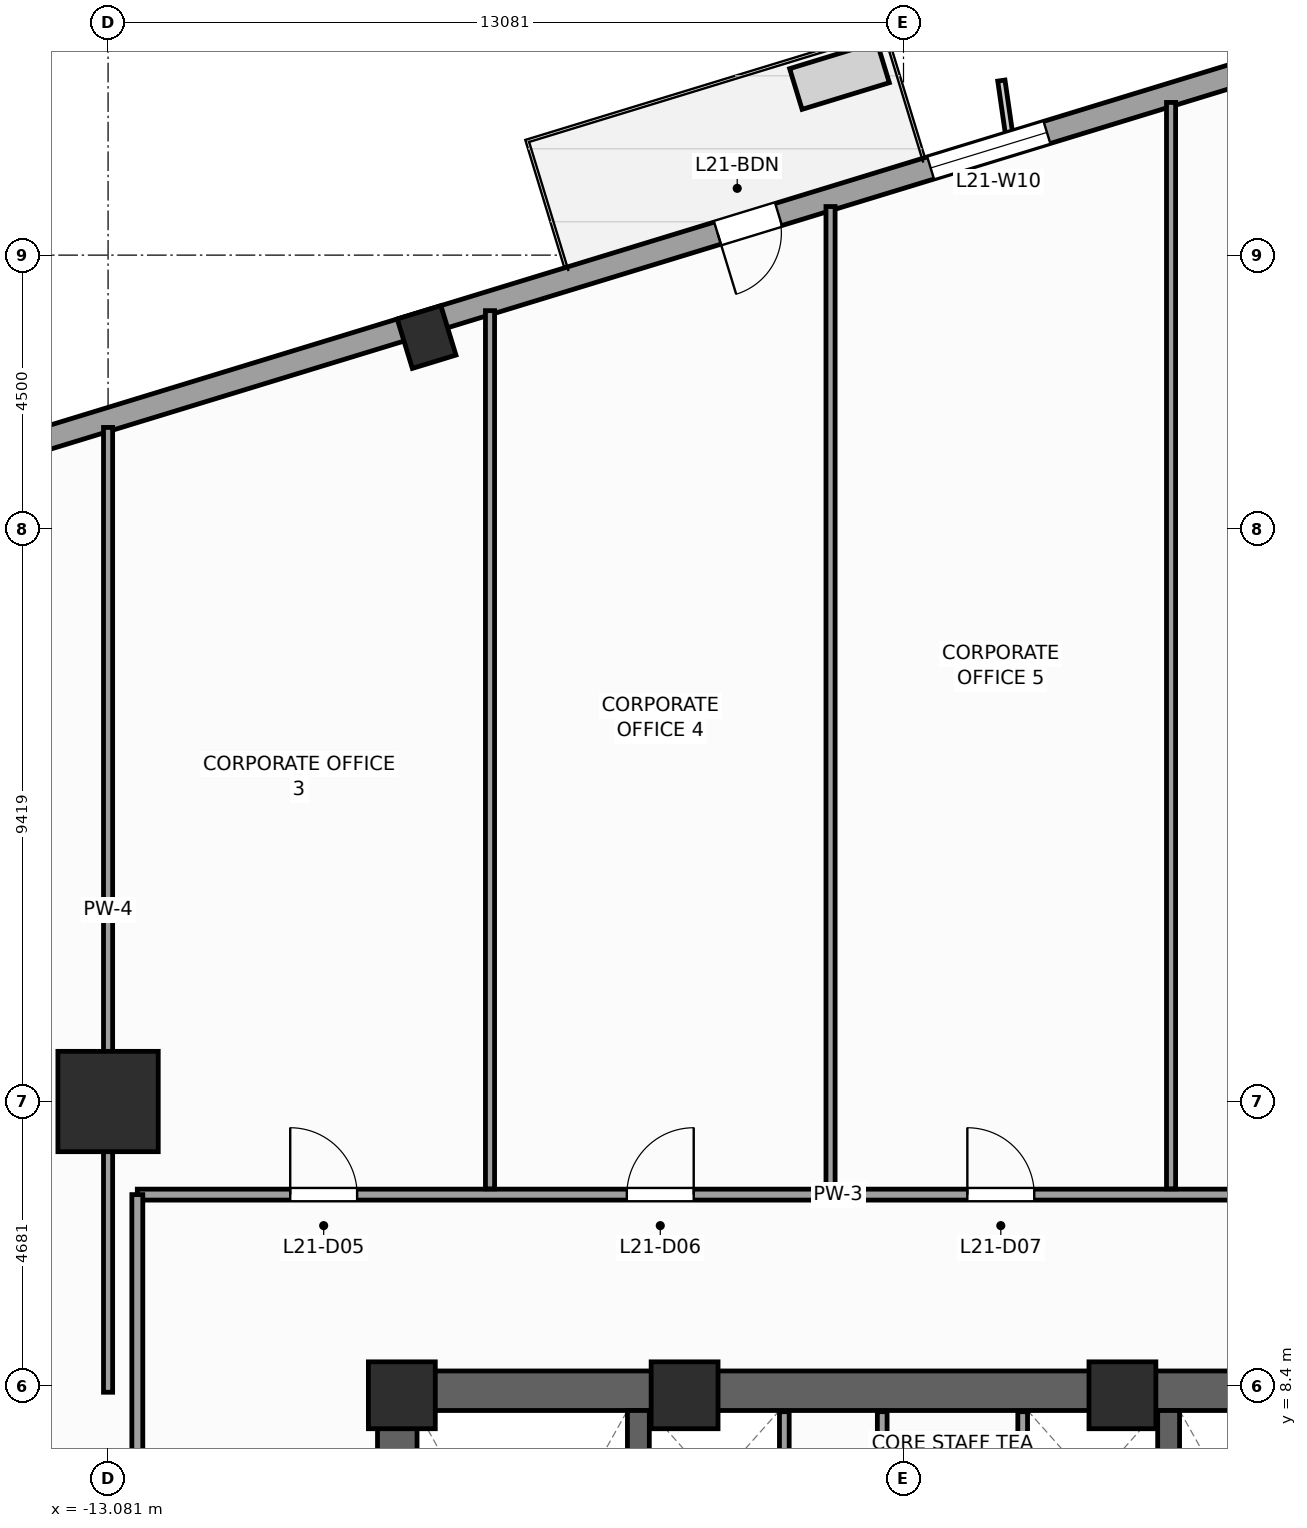
"""IFC4 building model, lengths in metres.
Left out: names, types, materials, properties, quantities, classifications, styles, units other than length and angle.
Written with IfcOpenShell. Run it as: python <this file> out.ifc"""

import sys

from ifc_helpers import new_model, si_unit, direction, frame, frame_2d, origin, origin_2d, place, context, subcontext, project, spatial, rectangle, extrude, source, transform, mapped, element, fill, save


model = new_model("IFC4")
c1 = context("Model", 3, precision=1e-05, world=origin(), true_north=direction((0.0, 1.0)))
c2 = subcontext(c1, "Body", "Model", "MODEL_VIEW")
j1 = project(units=[si_unit("LENGTHUNIT", "METRE"), si_unit("PLANEANGLEUNIT", "RADIAN")], contexts=[c1])
p1 = place(None, origin())
s1 = spatial("IfcSite", under=j1, at=p1, CompositionType="ELEMENT")
p2 = place(p1, origin())
s2 = spatial("IfcBuilding", under=s1, at=p2, CompositionType="ELEMENT")
p3 = place(p2, frame((0.0, 0.0, 91.2)))
s3 = spatial("IfcBuildingStorey", under=s2, at=p3, CompositionType="ELEMENT", Elevation=91.2)
p4 = place(p3, frame((-8.65, 8.325, 0.0), z_axis=(0.0, 0.0, 1.0), x_axis=(1.0, 0.0, 0.0)))
e1 = element("IfcWall", 1, at=p4, inside=s3, PredefinedType="SHEAR", context=c2, shape_type="SweptSolid", body=[
    extrude(rectangle(XDim=17.3, YDim=0.65, at=frame_2d((8.65, 0.0))), origin(), (0.0, 0.0, 1.0), 4.0),
])
p5 = place(p3, frame((-8.325, -8.0, 0.0), z_axis=(0.0, 0.0, 1.0), x_axis=(0.0, 1.0, 0.0)))
e2 = element("IfcWall", 2, at=p5, inside=s3, PredefinedType="SHEAR", context=c2, shape_type="SweptSolid", body=[
    extrude(rectangle(XDim=16.0, YDim=0.65, at=frame_2d((8.0, 0.0))), origin(), (0.0, 0.0, 1.0), 4.0),
])
p6 = place(p5, frame((4.69, 0.0, 0.0)))
e3 = element("IfcOpeningElement", 3, at=p6, cuts=e2, PredefinedType="OPENING", context=c2, shape_type="SweptSolid", body=[
    extrude(rectangle(XDim=1.3, YDim=2.2, at=frame_2d((0.65, 1.1))), frame((0.0, 0.335, 0.0), z_axis=(0.0, -1.0, 0.0), x_axis=(1.0, 0.0, 0.0)), (0.0, 0.0, 1.0), 0.67),
])
for number, where, z_axis, x_axis in (
    (4, (-4.36, -8.0, 0.0), (0.0, 0.0, 1.0), (0.0, 1.0, 0.0)),
    (5, (4.36, -8.0, 0.0), (0.0, 0.0, 1.0), (0.0, 1.0, 0.0)),
):
    element("IfcWall", number, at=place(p3, frame(where, z_axis=z_axis, x_axis=x_axis)), inside=s3, PredefinedType="SHEAR", context=c2, shape_type="SweptSolid", body=[
        extrude(rectangle(XDim=16.0, YDim=0.36, at=frame_2d((8.0, 0.0))), origin(), (0.0, 0.0, 1.0), 4.0),
    ])
m1 = source(origin(), c2, "Body", "SweptSolid", [
    extrude(rectangle(XDim=1.1, YDim=1.1, at=origin_2d()), origin(), (0.0, 0.0, 1.0), 4.0),
])
for number, where, z_axis, x_axis in (
    (6, (-8.25, 8.25, 0.0), (0.0, 0.0, 1.0), (1.0, 0.0, 0.0)),
    (7, (-3.6, 8.25, 0.0), (0.0, 0.0, 1.0), (1.0, 0.0, 0.0)),
    (8, (3.6, 8.25, 0.0), (0.0, 0.0, 1.0), (1.0, 0.0, 0.0)),
):
    element("IfcColumn", number, at=place(p3, frame(where, z_axis=z_axis, x_axis=x_axis)), inside=s3, PredefinedType="PILASTER", context=c2, shape_type="MappedRepresentation", body=[
        mapped(m1, transform((0.0, 0.0, 0.0), scale=1.0)),
    ])
m2 = source(origin(), c2, "Body", "SweptSolid", [
    extrude(rectangle(XDim=1.65, YDim=1.65, at=origin_2d()), origin(), (0.0, 0.0, 1.0), 4.0),
])
p7 = place(p3, frame((-13.081, 13.081, 0.0), z_axis=(0.0, 0.0, 1.0), x_axis=(1.0, 0.0, 0.0)))
e9 = element("IfcColumn", 9, at=p7, inside=s3, PredefinedType="COLUMN", context=c2, shape_type="MappedRepresentation", body=[
    mapped(m2, transform((0.0, 0.0, 0.0), scale=1.0)),
])
m3 = source(origin(), c2, "Body", "SweptSolid", [
    extrude(rectangle(XDim=0.75, YDim=0.85, at=origin_2d()), origin(), (0.0, 0.0, 1.0), 4.0),
])
p8 = place(p3, frame((-7.843, 25.653, 0.0), z_axis=(0.0, 0.0, 1.0), x_axis=(0.956304755963, 0.292371704723, 0.0)))
e10 = element("IfcColumn", 10, at=p8, inside=s3, PredefinedType="COLUMN", context=c2, shape_type="MappedRepresentation", body=[
    mapped(m3, transform((0.0, 0.0, 0.0), scale=1.0)),
])
p9 = place(p3, frame((14.265, 32.658, 0.0), z_axis=(0.0, 0.0, 1.0), x_axis=(-0.956304320851, -0.292373127906, 0.0)))
e11 = element("IfcWall", 11, at=p9, inside=s3, PredefinedType="STANDARD", context=c2, shape_type="SweptSolid", body=[
    extrude(rectangle(XDim=46.38, YDim=0.38, at=frame_2d((23.19, 0.0))), origin(), (0.0, 0.0, 1.0), 3.14),
])
p10 = place(p9, frame((17.065, 0.0, 0.0)))
e12 = element("IfcOpeningElement", 12, at=p10, cuts=e11, PredefinedType="OPENING", context=c2, shape_type="SweptSolid", body=[
    extrude(rectangle(XDim=1.05, YDim=2.25, at=frame_2d((0.525, 1.125))), frame((0.0, 0.2, 0.0), z_axis=(0.0, -1.0, 0.0), x_axis=(1.0, 0.0, 0.0)), (0.0, 0.0, 1.0), 0.4),
])
p11 = place(p9, frame((4.865, 0.0, 0.51)))
e13 = element("IfcOpeningElement", 13, at=p11, cuts=e11, PredefinedType="OPENING", context=c2, shape_type="SweptSolid", body=[
    extrude(rectangle(XDim=1.4, YDim=2.4, at=frame_2d((0.7, 1.2))), frame((0.0, 0.2, 0.0), z_axis=(0.0, -1.0, 0.0), x_axis=(1.0, 0.0, 0.0)), (0.0, 0.0, 1.0), 0.4),
])
p12 = place(p9, frame((12.45, 0.0, 0.51)))
e14 = element("IfcOpeningElement", 14, at=p12, cuts=e11, PredefinedType="OPENING", context=c2, shape_type="SweptSolid", body=[
    extrude(rectangle(XDim=2.0, YDim=2.4, at=frame_2d((1.0, 1.2))), frame((0.0, 0.2, 0.0), z_axis=(0.0, -1.0, 0.0), x_axis=(1.0, 0.0, 0.0)), (0.0, 0.0, 1.0), 0.4),
])
p13 = place(p9, frame((30.538, 0.0, 0.51)))
e15 = element("IfcOpeningElement", 15, at=p13, cuts=e11, PredefinedType="OPENING", context=c2, shape_type="SweptSolid", body=[
    extrude(rectangle(XDim=2.0, YDim=2.4, at=frame_2d((1.0, 1.2))), frame((0.0, 0.2, 0.0), z_axis=(0.0, -1.0, 0.0), x_axis=(1.0, 0.0, 0.0)), (0.0, 0.0, 1.0), 0.4),
])
p14 = place(p9, frame((39.187, 0.0, 0.51)))
e16 = element("IfcOpeningElement", 16, at=p14, cuts=e11, PredefinedType="OPENING", context=c2, shape_type="SweptSolid", body=[
    extrude(rectangle(XDim=1.4, YDim=2.4, at=frame_2d((0.7, 1.2))), frame((0.0, 0.2, 0.0), z_axis=(0.0, -1.0, 0.0), x_axis=(1.0, 0.0, 0.0)), (0.0, 0.0, 1.0), 0.4),
])
for number, where, z_axis, x_axis in (
    (17, (-1.96, 4.58, 0.0), (0.0, 0.0, 1.0), (0.0, 1.0, 0.0)),
    (18, (1.96, 4.58, 0.0), (0.0, 0.0, 1.0), (0.0, 1.0, 0.0)),
):
    element("IfcWall", number, at=place(p3, frame(where, z_axis=z_axis, x_axis=x_axis)), inside=s3, PredefinedType="PARTITIONING", context=c2, shape_type="SweptSolid", body=[
        extrude(rectangle(XDim=3.4, YDim=0.16, at=frame_2d((1.7, 0.0))), origin(), (0.0, 0.0, 1.0), 3.74),
    ])
p15 = place(p3, frame((-0.35, 4.6, 0.0), z_axis=(0.0, 0.0, 1.0), x_axis=(0.0, 1.0, 0.0)))
e19 = element("IfcWall", 19, at=p15, inside=s3, PredefinedType="PARTITIONING", context=c2, shape_type="SweptSolid", body=[
    extrude(rectangle(XDim=3.38, YDim=0.16, at=frame_2d((1.69, 0.0))), origin(), (0.0, 0.0, 1.0), 3.74),
])
p16 = place(p3, frame((-12.6, 11.55, 0.0), z_axis=(0.0, 0.0, 1.0), x_axis=(1.0, 0.0, 0.0)))
e20 = element("IfcWall", 20, at=p16, inside=s3, PredefinedType="PARTITIONING", context=c2, shape_type="SweptSolid", body=[
    extrude(rectangle(XDim=23.05, YDim=0.18, at=frame_2d((11.525, 0.0))), origin(), (0.0, 0.0, 1.0), 3.74),
])
p17 = place(p16, frame((2.514, 0.0, 0.0)))
e21 = element("IfcOpeningElement", 21, at=p17, cuts=e20, PredefinedType="OPENING", context=c2, shape_type="SweptSolid", body=[
    extrude(rectangle(XDim=1.1, YDim=2.2, at=frame_2d((0.55, 1.1))), frame((0.0, 0.1, 0.0), z_axis=(0.0, -1.0, 0.0), x_axis=(1.0, 0.0, 0.0)), (0.0, 0.0, 1.0), 0.2),
])
p18 = place(p16, frame((8.05, 0.0, 0.0)))
e22 = element("IfcOpeningElement", 22, at=p18, cuts=e20, PredefinedType="OPENING", context=c2, shape_type="SweptSolid", body=[
    extrude(rectangle(XDim=1.1, YDim=2.2, at=frame_2d((0.55, 1.1))), frame((0.0, 0.1, 0.0), z_axis=(0.0, -1.0, 0.0), x_axis=(1.0, 0.0, 0.0)), (0.0, 0.0, 1.0), 0.2),
])
p19 = place(p16, frame((13.65, 0.0, 0.0)))
e23 = element("IfcOpeningElement", 23, at=p19, cuts=e20, PredefinedType="OPENING", context=c2, shape_type="SweptSolid", body=[
    extrude(rectangle(XDim=1.1, YDim=2.2, at=frame_2d((0.55, 1.1))), frame((0.0, 0.1, 0.0), z_axis=(0.0, -1.0, 0.0), x_axis=(1.0, 0.0, 0.0)), (0.0, 0.0, 1.0), 0.2),
])
p20 = place(p16, frame((19.311, 0.0, 0.0)))
e24 = element("IfcOpeningElement", 24, at=p20, cuts=e20, PredefinedType="OPENING", context=c2, shape_type="SweptSolid", body=[
    extrude(rectangle(XDim=1.1, YDim=2.2, at=frame_2d((0.55, 1.1))), frame((0.0, 0.1, 0.0), z_axis=(0.0, -1.0, 0.0), x_axis=(1.0, 0.0, 0.0)), (0.0, 0.0, 1.0), 0.2),
])
p21 = place(p3, frame((-12.6, 1.15, 0.0), z_axis=(0.0, 0.0, 1.0), x_axis=(0.0, 1.0, 0.0)))
e25 = element("IfcWall", 25, at=p21, inside=s3, PredefinedType="PARTITIONING", context=c2, shape_type="SweptSolid", body=[
    extrude(rectangle(XDim=10.4, YDim=0.18, at=frame_2d((5.2, 0.0))), origin(), (0.0, 0.0, 1.0), 3.74),
])
p22 = place(p21, frame((4.812, 0.0, 0.0)))
e26 = element("IfcOpeningElement", 26, at=p22, cuts=e25, PredefinedType="OPENING", context=c2, shape_type="SweptSolid", body=[
    extrude(rectangle(XDim=1.1, YDim=2.2, at=frame_2d((0.55, 1.1))), frame((0.0, 0.1, 0.0), z_axis=(0.0, -1.0, 0.0), x_axis=(1.0, 0.0, 0.0)), (0.0, 0.0, 1.0), 0.2),
])
p23 = place(p3, frame((-13.081, 8.3, 0.0), z_axis=(0.0, 0.0, 1.0), x_axis=(0.0, 1.0, 0.0)))
e27 = element("IfcWall", 27, at=p23, inside=s3, PredefinedType="PARTITIONING", context=c2, shape_type="SweptSolid", body=[
    extrude(rectangle(XDim=15.866, YDim=0.15, at=frame_2d((7.933, 0.0))), origin(), (0.0, 0.0, 1.0), 2.732),
])
p24 = place(p3, frame((-6.8, 11.645, 0.0), z_axis=(0.0, 0.0, 1.0), x_axis=(0.0, 1.0, 0.0)))
e28 = element("IfcWall", 28, at=p24, inside=s3, PredefinedType="PARTITIONING", context=c2, shape_type="SweptSolid", body=[
    extrude(rectangle(XDim=14.442, YDim=0.15, at=frame_2d((7.221, 0.0))), origin(), (0.0, 0.0, 1.0), 3.74),
])
p25 = place(p3, frame((-1.2, 11.645, 0.0), z_axis=(0.0, 0.0, 1.0), x_axis=(0.0, 1.0, 0.0)))
e29 = element("IfcWall", 29, at=p25, inside=s3, PredefinedType="PARTITIONING", context=c2, shape_type="SweptSolid", body=[
    extrude(rectangle(XDim=16.154, YDim=0.15, at=frame_2d((8.077, 0.0))), origin(), (0.0, 0.0, 1.0), 3.74),
])
p26 = place(p3, frame((4.4, 11.645, 0.0), z_axis=(0.0, 0.0, 1.0), x_axis=(0.0, 1.0, 0.0)))
e30 = element("IfcWall", 30, at=p26, inside=s3, PredefinedType="PARTITIONING", context=c2, shape_type="SweptSolid", body=[
    extrude(rectangle(XDim=17.866, YDim=0.15, at=frame_2d((8.933, 0.0))), origin(), (0.0, 0.0, 1.0), 3.74),
])
m4 = source(origin(), c2, "Body", "SweptSolid", [
    extrude(rectangle(XDim=1.05, YDim=2.25, at=frame_2d((0.525, 1.125))), frame((0.0, 0.025, 0.0), z_axis=(0.0, -1.0, 0.0), x_axis=(1.0, 0.0, 0.0)), (0.0, 0.0, 1.0), 0.05),
])
p27 = place(p10, origin())
e31 = element("IfcDoor", 31, at=p27, inside=s3, OperationType="SINGLE_SWING_RIGHT", PredefinedType="DOOR", context=c2, shape_type="MappedRepresentation", body=[
    mapped(m4, transform((0.0, 0.0, 0.0), scale=1.0)),
])
fill(e12, e31)
m5 = source(origin(), c2, "Body", "SweptSolid", [
    extrude(rectangle(XDim=2.0, YDim=2.4, at=frame_2d((1.0, 1.2))), frame((0.0, 0.03, 0.0), z_axis=(0.0, -1.0, 0.0), x_axis=(1.0, 0.0, 0.0)), (0.0, 0.0, 1.0), 0.06),
])
p28 = place(p12, origin())
e32 = element("IfcWindow", 32, at=p28, inside=s3, PartitioningType="SINGLE_PANEL", PredefinedType="WINDOW", context=c2, shape_type="MappedRepresentation", body=[
    mapped(m5, transform((0.0, 0.0, 0.0), scale=1.0)),
])
fill(e14, e32)
m6 = source(origin(), c2, "Body", "SweptSolid", [
    extrude(rectangle(XDim=1.1, YDim=2.2, at=frame_2d((0.55, 1.1))), frame((0.0, 0.025, 0.0), z_axis=(0.0, -1.0, 0.0), x_axis=(1.0, 0.0, 0.0)), (0.0, 0.0, 1.0), 0.05),
])
p29 = place(p17, origin())
e33 = element("IfcDoor", 33, at=p29, inside=s3, OperationType="SINGLE_SWING_LEFT", PredefinedType="DOOR", context=c2, shape_type="MappedRepresentation", body=[
    mapped(m6, transform((0.0, 0.0, 0.0), scale=1.0)),
])
fill(e21, e33)
p30 = place(p18, origin())
e34 = element("IfcDoor", 34, at=p30, inside=s3, OperationType="SINGLE_SWING_RIGHT", PredefinedType="DOOR", context=c2, shape_type="MappedRepresentation", body=[
    mapped(m6, transform((0.0, 0.0, 0.0), scale=1.0)),
])
fill(e22, e34)
p31 = place(p19, origin())
e35 = element("IfcDoor", 35, at=p31, inside=s3, OperationType="SINGLE_SWING_LEFT", PredefinedType="DOOR", context=c2, shape_type="MappedRepresentation", body=[
    mapped(m6, transform((0.0, 0.0, 0.0), scale=1.0)),
])
fill(e23, e35)
save(model, sys.argv[1])
